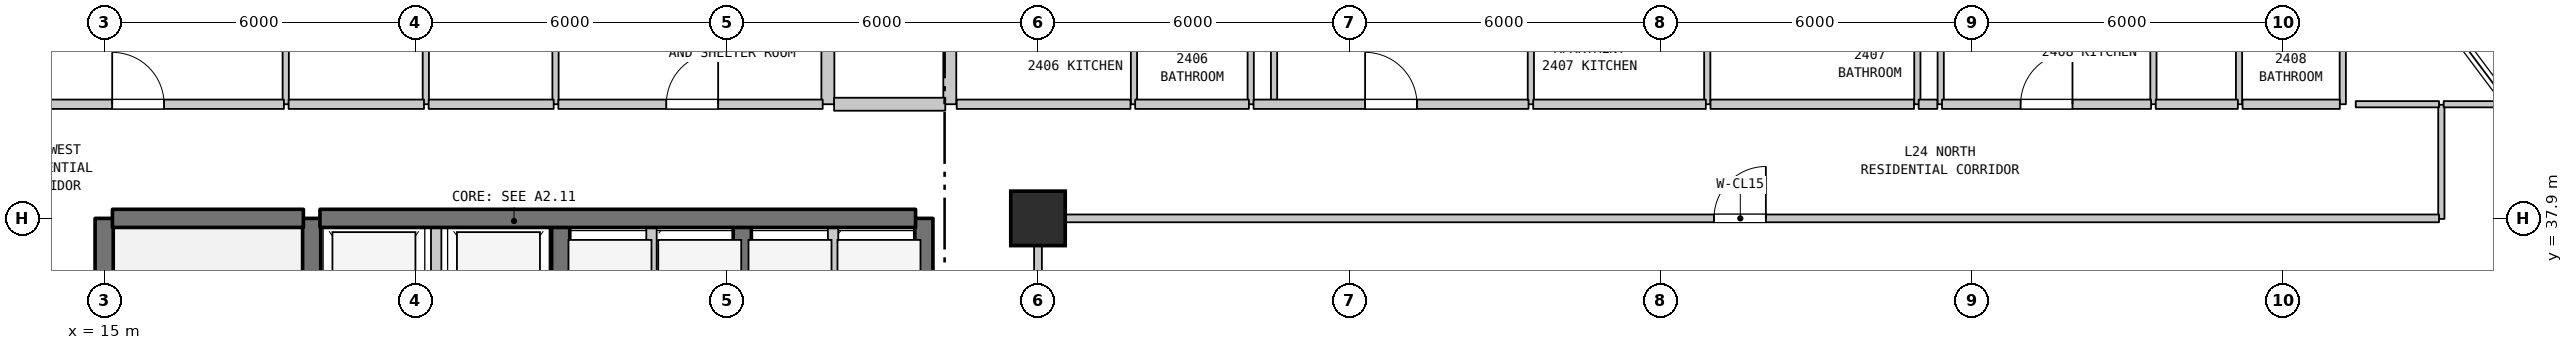
"""IFC4 building model, lengths in metres.
Left out: names, types, materials, properties, quantities, classifications, styles, units other than length and angle.
Written with IfcOpenShell. Run it as: python <this file> out.ifc"""

import sys

from ifc_helpers import new_model, si_unit, direction, frame, frame_2d, origin, origin_2d, place, context, subcontext, project, spatial, rectangle, extrude, element, fill, save


model = new_model("IFC4")
c1 = context("Model", 3, precision=1e-05, world=origin(), true_north=direction((0.0, 1.0)))
c2 = subcontext(c1, "Body", "Model", "MODEL_VIEW")
j1 = project(units=[si_unit("LENGTHUNIT", "METRE"), si_unit("PLANEANGLEUNIT", "RADIAN")], contexts=[c1])
p1 = place(None, origin())
s1 = spatial("IfcSite", under=j1, at=p1, CompositionType="ELEMENT")
p2 = place(p1, origin())
s2 = spatial("IfcBuilding", under=s1, at=p2, CompositionType="ELEMENT")
p3 = place(p2, frame((0.0, 0.0, 102.0)))
s3 = spatial("IfcBuildingStorey", under=s2, at=p3, CompositionType="ELEMENT", Elevation=102.0)
p4 = place(p3, frame((33.0, 37.9, 0.0), z_axis=(0.0, 0.0, 1.0), x_axis=(1.0, 0.0, 0.0)))
e1 = element("IfcColumn", 1, at=p4, inside=s3, PredefinedType="COLUMN", context=c2, shape_type="SweptSolid", body=[
    extrude(rectangle(XDim=1.05, YDim=1.05, at=origin_2d()), origin(), (0.0, 0.0, 1.0), 3.7),
])
p5 = place(p3, frame((15.0, 31.1, 0.0), z_axis=(0.0, 0.0, 1.0), x_axis=(0.0, 1.0, 0.0)))
e2 = element("IfcWall", 2, at=p5, inside=s3, PredefinedType="SHEAR", context=c2, shape_type="SweptSolid", body=[
    extrude(rectangle(XDim=6.8, YDim=0.35, at=frame_2d((3.4, 0.0))), origin(), (0.0, 0.0, 1.0), 3.385),
])
p6 = place(p3, frame((18.5, 40.1, 0.0), z_axis=(0.0, 0.0, 1.0), x_axis=(0.0, 1.0, 0.0)))
e3 = element("IfcWall", 3, at=p6, inside=s3, PredefinedType="PARTITIONING", context=c2, shape_type="SweptSolid", body=[
    extrude(rectangle(XDim=3.2, YDim=0.12, at=frame_2d((1.6, 0.0))), origin(), (0.0, 0.0, 1.0), 3.385),
])
p7 = place(p3, frame((19.0, 35.0, 0.0), z_axis=(0.0, 0.0, 1.0), x_axis=(0.0, 1.0, 0.0)))
e4 = element("IfcWall", 4, at=p7, inside=s3, PredefinedType="SHEAR", context=c2, shape_type="SweptSolid", body=[
    extrude(rectangle(XDim=2.9, YDim=0.35, at=frame_2d((1.45, 0.0))), origin(), (0.0, 0.0, 1.0), 3.385),
])
p8 = place(p3, frame((21.2, 40.1, 0.0), z_axis=(0.0, 0.0, 1.0), x_axis=(0.0, 1.0, 0.0)))
e5 = element("IfcWall", 5, at=p8, inside=s3, PredefinedType="PARTITIONING", context=c2, shape_type="SweptSolid", body=[
    extrude(rectangle(XDim=3.2, YDim=0.12, at=frame_2d((1.6, 0.0))), origin(), (0.0, 0.0, 1.0), 3.385),
])
p9 = place(p8, frame((1.15, 0.0, 0.0)))
e6 = element("IfcOpeningElement", 6, at=p9, cuts=e5, PredefinedType="OPENING", context=c2, shape_type="SweptSolid", body=[
    extrude(rectangle(XDim=0.9, YDim=2.15, at=frame_2d((0.45, 1.075))), frame((0.0, 0.07, 0.0), z_axis=(0.0, -1.0, 0.0), x_axis=(1.0, 0.0, 0.0)), (0.0, 0.0, 1.0), 0.14),
])
p10 = place(p3, frame((21.4, 35.0, 0.0), z_axis=(0.0, 0.0, 1.0), x_axis=(0.0, 1.0, 0.0)))
e7 = element("IfcWall", 7, at=p10, inside=s3, PredefinedType="STANDARD", context=c2, shape_type="SweptSolid", body=[
    extrude(rectangle(XDim=2.9, YDim=0.2, at=frame_2d((1.45, 0.0))), origin(), (0.0, 0.0, 1.0), 3.385),
])
p11 = place(p3, frame((23.7, 40.1, 0.0), z_axis=(0.0, 0.0, 1.0), x_axis=(0.0, 1.0, 0.0)))
e8 = element("IfcWall", 8, at=p11, inside=s3, PredefinedType="PARTITIONING", context=c2, shape_type="SweptSolid", body=[
    extrude(rectangle(XDim=2.05, YDim=0.12, at=frame_2d((1.025, 0.0))), origin(), (0.0, 0.0, 1.0), 3.385),
])
p12 = place(p3, frame((23.8, 35.0, 0.0), z_axis=(0.0, 0.0, 1.0), x_axis=(0.0, 1.0, 0.0)))
e9 = element("IfcWall", 9, at=p12, inside=s3, PredefinedType="SHEAR", context=c2, shape_type="SweptSolid", body=[
    extrude(rectangle(XDim=2.9, YDim=0.35, at=frame_2d((1.45, 0.0))), origin(), (0.0, 0.0, 1.0), 3.385),
])
p13 = place(p3, frame((25.55, 35.0, 0.0), z_axis=(0.0, 0.0, 1.0), x_axis=(0.0, 1.0, 0.0)))
e10 = element("IfcWall", 10, at=p13, inside=s3, PredefinedType="STANDARD", context=c2, shape_type="SweptSolid", body=[
    extrude(rectangle(XDim=2.9, YDim=0.2, at=frame_2d((1.45, 0.0))), origin(), (0.0, 0.0, 1.0), 3.385),
])
p14 = place(p3, frame((27.3, 35.0, 0.0), z_axis=(0.0, 0.0, 1.0), x_axis=(0.0, 1.0, 0.0)))
e11 = element("IfcWall", 11, at=p14, inside=s3, PredefinedType="SHEAR", context=c2, shape_type="SweptSolid", body=[
    extrude(rectangle(XDim=2.9, YDim=0.35, at=frame_2d((1.45, 0.0))), origin(), (0.0, 0.0, 1.0), 3.385),
])
p15 = place(p3, frame((28.95, 40.1, 0.0), z_axis=(0.0, 0.0, 1.0), x_axis=(0.0, 1.0, 0.0)))
e12 = element("IfcWall", 12, at=p15, inside=s3, PredefinedType="STANDARD", context=c2, shape_type="SweptSolid", body=[
    extrude(rectangle(XDim=2.3, YDim=0.25, at=frame_2d((1.15, 0.0))), origin(), (0.0, 0.0, 1.0), 3.385),
])
p16 = place(p3, frame((29.05, 35.0, 0.0), z_axis=(0.0, 0.0, 1.0), x_axis=(0.0, 1.0, 0.0)))
e13 = element("IfcWall", 13, at=p16, inside=s3, PredefinedType="STANDARD", context=c2, shape_type="SweptSolid", body=[
    extrude(rectangle(XDim=2.9, YDim=0.2, at=frame_2d((1.45, 0.0))), origin(), (0.0, 0.0, 1.0), 3.385),
])
p17 = place(p3, frame((30.8, 35.0, 0.0), z_axis=(0.0, 0.0, 1.0), x_axis=(0.0, 1.0, 0.0)))
e14 = element("IfcWall", 14, at=p17, inside=s3, PredefinedType="SHEAR", context=c2, shape_type="SweptSolid", body=[
    extrude(rectangle(XDim=2.9, YDim=0.35, at=frame_2d((1.45, 0.0))), origin(), (0.0, 0.0, 1.0), 3.385),
])
p18 = place(p3, frame((31.3, 40.1, 0.0), z_axis=(0.0, 0.0, 1.0), x_axis=(0.0, 1.0, 0.0)))
e15 = element("IfcWall", 15, at=p18, inside=s3, PredefinedType="STANDARD", context=c2, shape_type="SweptSolid", body=[
    extrude(rectangle(XDim=2.3, YDim=0.25, at=frame_2d((1.15, 0.0))), origin(), (0.0, 0.0, 1.0), 3.385),
])
p19 = place(p3, frame((33.0, 27.91, 0.0), z_axis=(0.0, 0.0, 1.0), x_axis=(0.0, 1.0, 0.0)))
e16 = element("IfcWall", 16, at=p19, inside=s3, PredefinedType="STANDARD", context=c2, shape_type="SweptSolid", body=[
    extrude(rectangle(XDim=9.98, YDim=0.15, at=frame_2d((4.99, 0.0))), origin(), (0.0, 0.0, 1.0), 2.885),
])
for number, where, z_axis, x_axis in (
    (17, (34.85, 40.1, 0.0), (0.0, 0.0, 1.0), (0.0, 1.0, 0.0)),
    (18, (37.1, 40.1, 0.0), (0.0, 0.0, 1.0), (0.0, 1.0, 0.0)),
):
    element("IfcWall", number, at=place(p3, frame(where, z_axis=z_axis, x_axis=x_axis)), inside=s3, PredefinedType="PARTITIONING", context=c2, shape_type="SweptSolid", body=[
        extrude(rectangle(XDim=2.3, YDim=0.12, at=frame_2d((1.15, 0.0))), origin(), (0.0, 0.0, 1.0), 3.385),
    ])
p20 = place(p3, frame((37.55, 40.1, 0.0), z_axis=(0.0, 0.0, 1.0), x_axis=(0.0, 1.0, 0.0)))
e19 = element("IfcWall", 19, at=p20, inside=s3, PredefinedType="PARTITIONING", context=c2, shape_type="SweptSolid", body=[
    extrude(rectangle(XDim=2.05, YDim=0.12, at=frame_2d((1.025, 0.0))), origin(), (0.0, 0.0, 1.0), 3.385),
])
for number, where, z_axis, x_axis in (
    (20, (42.5, 40.1, 0.0), (0.0, 0.0, 1.0), (0.0, 1.0, 0.0)),
    (21, (45.9, 40.1, 0.0), (0.0, 0.0, 1.0), (0.0, 1.0, 0.0)),
    (22, (49.95, 40.1, 0.0), (0.0, 0.0, 1.0), (0.0, 1.0, 0.0)),
):
    element("IfcWall", number, at=place(p3, frame(where, z_axis=z_axis, x_axis=x_axis)), inside=s3, PredefinedType="PARTITIONING", context=c2, shape_type="SweptSolid", body=[
        extrude(rectangle(XDim=2.3, YDim=0.12, at=frame_2d((1.15, 0.0))), origin(), (0.0, 0.0, 1.0), 3.385),
    ])
p21 = place(p3, frame((50.4, 40.1, 0.0), z_axis=(0.0, 0.0, 1.0), x_axis=(0.0, 1.0, 0.0)))
e23 = element("IfcWall", 23, at=p21, inside=s3, PredefinedType="PARTITIONING", context=c2, shape_type="SweptSolid", body=[
    extrude(rectangle(XDim=5.35, YDim=0.12, at=frame_2d((2.675, 0.0))), origin(), (0.0, 0.0, 1.0), 3.385),
])
for number, where, z_axis, x_axis in (
    (24, (54.5, 40.1, 0.0), (0.0, 0.0, 1.0), (0.0, 1.0, 0.0)),
    (25, (56.15, 40.1, 0.0), (0.0, 0.0, 1.0), (0.0, 1.0, 0.0)),
    (26, (58.15, 40.1, 0.0), (0.0, 0.0, 1.0), (0.0, 1.0, 0.0)),
):
    element("IfcWall", number, at=place(p3, frame(where, z_axis=z_axis, x_axis=x_axis)), inside=s3, PredefinedType="PARTITIONING", context=c2, shape_type="SweptSolid", body=[
        extrude(rectangle(XDim=2.3, YDim=0.12, at=frame_2d((1.15, 0.0))), origin(), (0.0, 0.0, 1.0), 3.385),
    ])
p22 = place(p3, frame((60.05, 37.89, 0.0), z_axis=(0.0, 0.0, 1.0), x_axis=(0.0, 1.0, 0.0)))
e27 = element("IfcWall", 27, at=p22, inside=s3, PredefinedType="PARTITIONING", context=c2, shape_type="SweptSolid", body=[
    extrude(rectangle(XDim=2.2, YDim=0.12, at=frame_2d((1.1, 0.0))), origin(), (0.0, 0.0, 1.0), 3.385),
])
p23 = place(p3, frame((15.16, 37.9, 0.0), z_axis=(0.0, 0.0, 1.0), x_axis=(1.0, 0.0, 0.0)))
e28 = element("IfcWall", 28, at=p23, inside=s3, PredefinedType="SHEAR", context=c2, shape_type="SweptSolid", body=[
    extrude(rectangle(XDim=3.68, YDim=0.35, at=frame_2d((1.84, 0.0))), origin(), (0.0, 0.0, 1.0), 3.385),
])
p24 = place(p3, frame((19.16, 37.9, 0.0), z_axis=(0.0, 0.0, 1.0), x_axis=(1.0, 0.0, 0.0)))
e29 = element("IfcWall", 29, at=p24, inside=s3, PredefinedType="SHEAR", context=c2, shape_type="SweptSolid", body=[
    extrude(rectangle(XDim=11.48, YDim=0.35, at=frame_2d((5.74, 0.0))), origin(), (0.0, 0.0, 1.0), 3.385),
])
p25 = place(p3, frame((33.07, 37.9, 0.0), z_axis=(0.0, 0.0, 1.0), x_axis=(1.0, 0.0, 0.0)))
e30 = element("IfcWall", 30, at=p25, inside=s3, PredefinedType="STANDARD", context=c2, shape_type="SweptSolid", body=[
    extrude(rectangle(XDim=26.935, YDim=0.15, at=frame_2d((13.467, 0.0))), origin(), (0.0, 0.0, 1.0), 3.385),
])
p26 = place(p25, frame((12.96, 0.0, 0.0)))
e31 = element("IfcOpeningElement", 31, at=p26, cuts=e30, PredefinedType="OPENING", context=c2, shape_type="SweptSolid", body=[
    extrude(rectangle(XDim=1.0, YDim=2.15, at=frame_2d((0.5, 1.075))), frame((0.0, 0.085, 0.0), z_axis=(0.0, -1.0, 0.0), x_axis=(1.0, 0.0, 0.0)), (0.0, 0.0, 1.0), 0.17),
])
p27 = place(p3, frame((12.875, 40.1, 0.0), z_axis=(0.0, 0.0, 1.0), x_axis=(1.0, 0.0, 0.0)))
e32 = element("IfcWall", 32, at=p27, inside=s3, PredefinedType="STANDARD", context=c2, shape_type="SweptSolid", body=[
    extrude(rectangle(XDim=5.59, YDim=0.18, at=frame_2d((2.795, 0.0))), origin(), (0.0, 0.0, 1.0), 3.385),
])
p28 = place(p27, frame((2.28, 0.0, 0.0)))
e33 = element("IfcOpeningElement", 33, at=p28, cuts=e32, PredefinedType="OPENING", context=c2, shape_type="SweptSolid", body=[
    extrude(rectangle(XDim=1.0, YDim=2.15, at=frame_2d((0.5, 1.075))), frame((0.0, 0.1, 0.0), z_axis=(0.0, -1.0, 0.0), x_axis=(1.0, 0.0, 0.0)), (0.0, 0.0, 1.0), 0.2),
])
p29 = place(p3, frame((18.555, 40.1, 0.0), z_axis=(0.0, 0.0, 1.0), x_axis=(1.0, 0.0, 0.0)))
e34 = element("IfcWall", 34, at=p29, inside=s3, PredefinedType="STANDARD", context=c2, shape_type="SweptSolid", body=[
    extrude(rectangle(XDim=2.61, YDim=0.18, at=frame_2d((1.305, 0.0))), origin(), (0.0, 0.0, 1.0), 3.385),
])
p30 = place(p3, frame((21.255, 40.1, 0.0), z_axis=(0.0, 0.0, 1.0), x_axis=(1.0, 0.0, 0.0)))
e35 = element("IfcWall", 35, at=p30, inside=s3, PredefinedType="STANDARD", context=c2, shape_type="SweptSolid", body=[
    extrude(rectangle(XDim=2.41, YDim=0.18, at=frame_2d((1.205, 0.0))), origin(), (0.0, 0.0, 1.0), 3.385),
])
p31 = place(p3, frame((23.755, 40.1, 0.0), z_axis=(0.0, 0.0, 1.0), x_axis=(1.0, 0.0, 0.0)))
e36 = element("IfcWall", 36, at=p31, inside=s3, PredefinedType="STANDARD", context=c2, shape_type="SweptSolid", body=[
    extrude(rectangle(XDim=5.095, YDim=0.18, at=frame_2d((2.548, 0.0))), origin(), (0.0, 0.0, 1.0), 3.385),
])
p32 = place(p31, frame((2.08, 0.0, 0.0)))
e37 = element("IfcOpeningElement", 37, at=p32, cuts=e36, PredefinedType="OPENING", context=c2, shape_type="SweptSolid", body=[
    extrude(rectangle(XDim=1.0, YDim=2.15, at=frame_2d((0.5, 1.075))), frame((0.0, 0.1, 0.0), z_axis=(0.0, -1.0, 0.0), x_axis=(1.0, 0.0, 0.0)), (0.0, 0.0, 1.0), 0.2),
])
p33 = place(p3, frame((29.07, 40.1, 0.0), z_axis=(0.0, 0.0, 1.0), x_axis=(1.0, 0.0, 0.0)))
e38 = element("IfcWall", 38, at=p33, inside=s3, PredefinedType="STANDARD", context=c2, shape_type="SweptSolid", body=[
    extrude(rectangle(XDim=2.143, YDim=0.25, at=frame_2d((1.071, 0.0))), origin(), (0.0, 0.0, 1.0), 3.385),
])
p34 = place(p3, frame((31.433, 40.1, 0.0), z_axis=(0.0, 0.0, 1.0), x_axis=(1.0, 0.0, 0.0)))
e39 = element("IfcWall", 39, at=p34, inside=s3, PredefinedType="STANDARD", context=c2, shape_type="SweptSolid", body=[
    extrude(rectangle(XDim=3.35, YDim=0.18, at=frame_2d((1.675, 0.0))), origin(), (0.0, 0.0, 1.0), 3.385),
])
p35 = place(p3, frame((34.873, 40.1, 0.0), z_axis=(0.0, 0.0, 1.0), x_axis=(1.0, 0.0, 0.0)))
e40 = element("IfcWall", 40, at=p35, inside=s3, PredefinedType="STANDARD", context=c2, shape_type="SweptSolid", body=[
    extrude(rectangle(XDim=2.192, YDim=0.18, at=frame_2d((1.096, 0.0))), origin(), (0.0, 0.0, 1.0), 3.385),
])
p36 = place(p3, frame((37.155, 40.1, 0.0), z_axis=(0.0, 0.0, 1.0), x_axis=(1.0, 0.0, 0.0)))
e41 = element("IfcWall", 41, at=p36, inside=s3, PredefinedType="STANDARD", context=c2, shape_type="SweptSolid", body=[
    extrude(rectangle(XDim=5.3, YDim=0.18, at=frame_2d((2.65, 0.0))), origin(), (0.0, 0.0, 1.0), 3.385),
])
p37 = place(p36, frame((2.15, 0.0, 0.0)))
e42 = element("IfcOpeningElement", 42, at=p37, cuts=e41, PredefinedType="OPENING", context=c2, shape_type="SweptSolid", body=[
    extrude(rectangle(XDim=1.0, YDim=2.15, at=frame_2d((0.5, 1.075))), frame((0.0, 0.1, 0.0), z_axis=(0.0, -1.0, 0.0), x_axis=(1.0, 0.0, 0.0)), (0.0, 0.0, 1.0), 0.2),
])
p38 = place(p3, frame((42.545, 40.1, 0.0), z_axis=(0.0, 0.0, 1.0), x_axis=(1.0, 0.0, 0.0)))
e43 = element("IfcWall", 43, at=p38, inside=s3, PredefinedType="STANDARD", context=c2, shape_type="SweptSolid", body=[
    extrude(rectangle(XDim=3.328, YDim=0.18, at=frame_2d((1.664, 0.0))), origin(), (0.0, 0.0, 1.0), 3.385),
])
p39 = place(p3, frame((45.963, 40.1, 0.0), z_axis=(0.0, 0.0, 1.0), x_axis=(1.0, 0.0, 0.0)))
e44 = element("IfcWall", 44, at=p39, inside=s3, PredefinedType="STANDARD", context=c2, shape_type="SweptSolid", body=[
    extrude(rectangle(XDim=3.922, YDim=0.18, at=frame_2d((1.961, 0.0))), origin(), (0.0, 0.0, 1.0), 3.385),
])
p40 = place(p3, frame((49.975, 40.1, 0.0), z_axis=(0.0, 0.0, 1.0), x_axis=(1.0, 0.0, 0.0)))
e45 = element("IfcWall", 45, at=p40, inside=s3, PredefinedType="STANDARD", context=c2, shape_type="SweptSolid", body=[
    extrude(rectangle(XDim=0.36, YDim=0.18, at=frame_2d((0.18, 0.0))), origin(), (0.0, 0.0, 1.0), 3.385),
])
p41 = place(p3, frame((50.425, 40.1, 0.0), z_axis=(0.0, 0.0, 1.0), x_axis=(1.0, 0.0, 0.0)))
e46 = element("IfcWall", 46, at=p41, inside=s3, PredefinedType="STANDARD", context=c2, shape_type="SweptSolid", body=[
    extrude(rectangle(XDim=4.03, YDim=0.18, at=frame_2d((2.015, 0.0))), origin(), (0.0, 0.0, 1.0), 3.385),
])
p42 = place(p41, frame((1.515, 0.0, 0.0)))
e47 = element("IfcOpeningElement", 47, at=p42, cuts=e46, PredefinedType="OPENING", context=c2, shape_type="SweptSolid", body=[
    extrude(rectangle(XDim=1.0, YDim=2.15, at=frame_2d((0.5, 1.075))), frame((0.0, 0.1, 0.0), z_axis=(0.0, -1.0, 0.0), x_axis=(1.0, 0.0, 0.0)), (0.0, 0.0, 1.0), 0.2),
])
p43 = place(p3, frame((54.545, 40.1, 0.0), z_axis=(0.0, 0.0, 1.0), x_axis=(1.0, 0.0, 0.0)))
e48 = element("IfcWall", 48, at=p43, inside=s3, PredefinedType="STANDARD", context=c2, shape_type="SweptSolid", body=[
    extrude(rectangle(XDim=1.583, YDim=0.18, at=frame_2d((0.792, 0.0))), origin(), (0.0, 0.0, 1.0), 3.385),
])
p44 = place(p3, frame((56.218, 40.1, 0.0), z_axis=(0.0, 0.0, 1.0), x_axis=(1.0, 0.0, 0.0)))
e49 = element("IfcWall", 49, at=p44, inside=s3, PredefinedType="STANDARD", context=c2, shape_type="SweptSolid", body=[
    extrude(rectangle(XDim=1.875, YDim=0.18, at=frame_2d((0.938, 0.0))), origin(), (0.0, 0.0, 1.0), 3.385),
])
p45 = place(p3, frame((58.4, 40.1, 0.0), z_axis=(0.0, 0.0, 1.0), x_axis=(1.0, 0.0, 0.0)))
e50 = element("IfcWall", 50, at=p45, inside=s3, PredefinedType="PARTITIONING", context=c2, shape_type="SweptSolid", body=[
    extrude(rectangle(XDim=1.605, YDim=0.12, at=frame_2d((0.802, 0.0))), origin(), (0.0, 0.0, 1.0), 3.385),
])
p46 = place(p3, frame((60.095, 40.1, 0.0), z_axis=(0.0, 0.0, 1.0), x_axis=(1.0, 0.0, 0.0)))
e51 = element("IfcWall", 51, at=p46, inside=s3, PredefinedType="PARTITIONING", context=c2, shape_type="SweptSolid", body=[
    extrude(rectangle(XDim=1.245, YDim=0.12, at=frame_2d((0.623, 0.0))), origin(), (0.0, 0.0, 1.0), 3.385),
])
p47 = place(p26, origin())
e52 = element("IfcDoor", 52, at=p47, inside=s3, OperationType="SINGLE_SWING_RIGHT", PredefinedType="DOOR", context=c2, shape_type="SweptSolid", body=[
    extrude(rectangle(XDim=1.0, YDim=2.15, at=frame_2d((0.5, 1.075))), frame((0.0, 0.025, 0.0), z_axis=(0.0, -1.0, 0.0), x_axis=(1.0, 0.0, 0.0)), (0.0, 0.0, 1.0), 0.05),
])
fill(e31, e52)
p48 = place(p28, origin())
e53 = element("IfcDoor", 53, at=p48, inside=s3, OperationType="SINGLE_SWING_LEFT", PredefinedType="DOOR", context=c2, shape_type="SweptSolid", body=[
    extrude(rectangle(XDim=1.0, YDim=2.15, at=frame_2d((0.5, 1.075))), frame((0.0, 0.025, 0.0), z_axis=(0.0, -1.0, 0.0), x_axis=(1.0, 0.0, 0.0)), (0.0, 0.0, 1.0), 0.05),
])
fill(e33, e53)
p49 = place(p32, origin())
e54 = element("IfcDoor", 54, at=p49, inside=s3, OperationType="SINGLE_SWING_RIGHT", PredefinedType="DOOR", context=c2, shape_type="SweptSolid", body=[
    extrude(rectangle(XDim=1.0, YDim=2.15, at=frame_2d((0.5, 1.075))), frame((0.0, 0.025, 0.0), z_axis=(0.0, -1.0, 0.0), x_axis=(1.0, 0.0, 0.0)), (0.0, 0.0, 1.0), 0.05),
])
fill(e37, e54)
p50 = place(p37, origin())
e55 = element("IfcDoor", 55, at=p50, inside=s3, OperationType="SINGLE_SWING_LEFT", PredefinedType="DOOR", context=c2, shape_type="SweptSolid", body=[
    extrude(rectangle(XDim=1.0, YDim=2.15, at=frame_2d((0.5, 1.075))), frame((0.0, 0.025, 0.0), z_axis=(0.0, -1.0, 0.0), x_axis=(1.0, 0.0, 0.0)), (0.0, 0.0, 1.0), 0.05),
])
fill(e42, e55)
p51 = place(p42, origin())
e56 = element("IfcDoor", 56, at=p51, inside=s3, OperationType="SINGLE_SWING_RIGHT", PredefinedType="DOOR", context=c2, shape_type="SweptSolid", body=[
    extrude(rectangle(XDim=1.0, YDim=2.15, at=frame_2d((0.5, 1.075))), frame((0.0, 0.025, 0.0), z_axis=(0.0, -1.0, 0.0), x_axis=(1.0, 0.0, 0.0)), (0.0, 0.0, 1.0), 0.05),
])
fill(e47, e56)
save(model, sys.argv[1])
